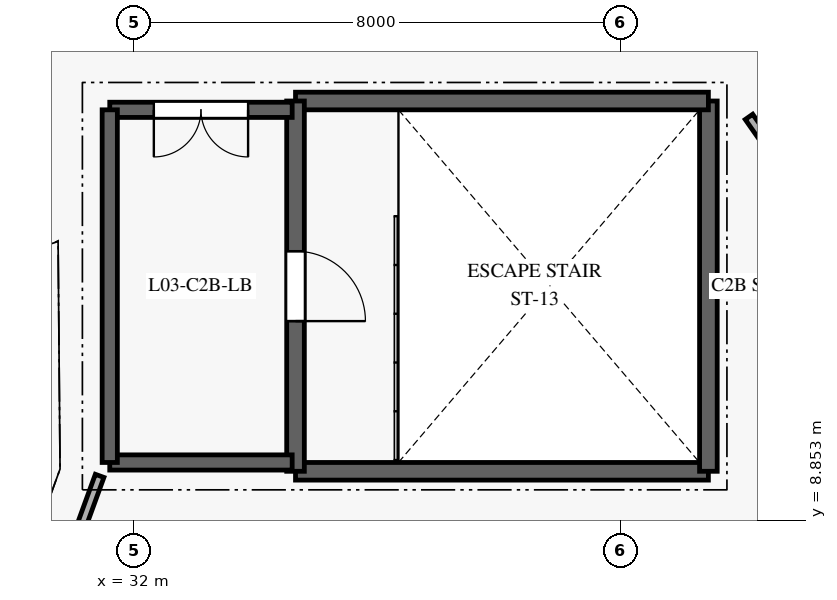
"""IFC4 building model, lengths in metres.
Left out: names, types, materials, properties, quantities, classifications, styles, units other than length and angle.
Written with IfcOpenShell. Run it as: python <this file> out.ifc"""

import sys

from ifc_helpers import new_model, si_unit, direction, frame, frame_2d, origin, place, context, subcontext, project, spatial, rectangle, extrude, element, fill, save


model = new_model("IFC4")
c1 = context("Model", 3, precision=1e-05, world=origin(), true_north=direction((0.0, 1.0)))
c2 = subcontext(c1, "Body", "Model", "MODEL_VIEW")
j1 = project(units=[si_unit("LENGTHUNIT", "METRE"), si_unit("PLANEANGLEUNIT", "RADIAN")], contexts=[c1])
p1 = place(None, origin())
s1 = spatial("IfcSite", under=j1, at=p1, CompositionType="ELEMENT")
p2 = place(p1, origin())
s2 = spatial("IfcBuilding", under=s1, at=p2, CompositionType="ELEMENT")
p3 = place(p2, frame((0.0, 0.0, 12.6)))
s3 = spatial("IfcBuildingStorey", under=s2, at=p3, CompositionType="ELEMENT", Elevation=12.6)
p4 = place(p3, frame((34.655, 9.655, 0.0), z_axis=(0.0, 0.0, 1.0), x_axis=(1.0, 0.0, 0.0)))
e1 = element("IfcWall", 1, at=p4, inside=s3, PredefinedType="SHEAR", context=c2, shape_type="SweptSolid", body=[
    extrude(rectangle(XDim=6.79, YDim=0.29, at=frame_2d((3.395, 0.0))), origin(), (0.0, 0.0, 1.0), 3.95),
])
p5 = place(p3, frame((41.445, 9.655, 0.0), z_axis=(0.0, 0.0, 1.0), x_axis=(0.0, 1.0, 0.0)))
e2 = element("IfcWall", 2, at=p5, inside=s3, PredefinedType="SHEAR", context=c2, shape_type="SweptSolid", body=[
    extrude(rectangle(XDim=6.09, YDim=0.29, at=frame_2d((3.045, 0.0))), origin(), (0.0, 0.0, 1.0), 3.95),
])
p6 = place(p3, frame((41.445, 15.745, 0.0), z_axis=(0.0, 0.0, 1.0), x_axis=(-1.0, 0.0, 0.0)))
e3 = element("IfcWall", 3, at=p6, inside=s3, PredefinedType="SHEAR", context=c2, shape_type="SweptSolid", body=[
    extrude(rectangle(XDim=6.79, YDim=0.29, at=frame_2d((3.395, 0.0))), origin(), (0.0, 0.0, 1.0), 3.95),
])
p7 = place(p3, frame((34.655, 15.745, 0.0), z_axis=(0.0, 0.0, 1.0), x_axis=(0.0, -1.0, 0.0)))
e4 = element("IfcWall", 4, at=p7, inside=s3, PredefinedType="SHEAR", context=c2, shape_type="SweptSolid", body=[
    extrude(rectangle(XDim=6.09, YDim=0.29, at=frame_2d((3.045, 0.0))), origin(), (0.0, 0.0, 1.0), 3.95),
])
p8 = place(p7, frame((2.47, 0.0, 0.0)))
e5 = element("IfcOpeningElement", 5, at=p8, cuts=e4, PredefinedType="OPENING", context=c2, shape_type="SweptSolid", body=[
    extrude(rectangle(XDim=1.15, YDim=2.1, at=frame_2d((0.575, 1.05))), frame((0.0, 0.155, 0.0), z_axis=(0.0, -1.0, 0.0), x_axis=(1.0, 0.0, 0.0)), (0.0, 0.0, 1.0), 0.31),
])
p9 = place(p3, frame((31.6, 9.8, 0.0), z_axis=(0.0, 0.0, 1.0), x_axis=(1.0, 0.0, 0.0)))
e6 = element("IfcWall", 6, at=p9, inside=s3, PredefinedType="SHEAR", context=c2, shape_type="SweptSolid", body=[
    extrude(rectangle(XDim=3.0, YDim=0.25, at=frame_2d((1.5, 0.0))), origin(), (0.0, 0.0, 1.0), 3.95),
])
p10 = place(p3, frame((34.6, 15.6, 0.0), z_axis=(0.0, 0.0, 1.0), x_axis=(-1.0, 0.0, 0.0)))
e7 = element("IfcWall", 7, at=p10, inside=s3, PredefinedType="SHEAR", context=c2, shape_type="SweptSolid", body=[
    extrude(rectangle(XDim=3.0, YDim=0.25, at=frame_2d((1.5, 0.0))), origin(), (0.0, 0.0, 1.0), 3.95),
])
p11 = place(p10, frame((0.725, 0.0, 0.0)))
e8 = element("IfcOpeningElement", 8, at=p11, cuts=e7, PredefinedType="OPENING", context=c2, shape_type="SweptSolid", body=[
    extrude(rectangle(XDim=1.55, YDim=2.15, at=frame_2d((0.775, 1.075))), frame((0.0, 0.135, 0.0), z_axis=(0.0, -1.0, 0.0), x_axis=(1.0, 0.0, 0.0)), (0.0, 0.0, 1.0), 0.27),
])
p12 = place(p3, frame((31.6, 15.6, 0.0), z_axis=(0.0, 0.0, 1.0), x_axis=(0.0, -1.0, 0.0)))
e9 = element("IfcWall", 9, at=p12, inside=s3, PredefinedType="SHEAR", context=c2, shape_type="SweptSolid", body=[
    extrude(rectangle(XDim=5.8, YDim=0.25, at=frame_2d((2.9, 0.0))), origin(), (0.0, 0.0, 1.0), 3.95),
])
p13 = place(p3, frame((31.028, 8.464, 0.0), z_axis=(0.0, 0.0, 1.0), x_axis=(0.341957686727, 0.939715350778, 0.0)))
e10 = element("IfcWall", 10, at=p13, inside=s3, PredefinedType="PARTITIONING", context=c2, shape_type="SweptSolid", body=[
    extrude(rectangle(XDim=1.187, YDim=0.15, at=frame_2d((0.594, 0.0))), origin(), (0.0, 0.0, 1.0), 3.95),
])
p14 = place(p3, frame((42.113, 15.484, 0.0), z_axis=(0.0, 0.0, 1.0), x_axis=(0.573593915898, -0.8191398047, 0.0)))
e11 = element("IfcWall", 11, at=p14, inside=s3, PredefinedType="PARTITIONING", context=c2, shape_type="SweptSolid", body=[
    extrude(rectangle(XDim=6.102, YDim=0.15, at=frame_2d((3.051, 0.0))), origin(), (0.0, 0.0, 1.0), 3.95),
])
p15 = place(p8, origin())
e12 = element("IfcDoor", 12, at=p15, inside=s3, OperationType="SINGLE_SWING_RIGHT", PredefinedType="DOOR", context=c2, shape_type="SweptSolid", body=[
    extrude(rectangle(XDim=1.15, YDim=2.1, at=frame_2d((0.575, 1.05))), frame((0.0, 0.025, 0.0), z_axis=(0.0, -1.0, 0.0), x_axis=(1.0, 0.0, 0.0)), (0.0, 0.0, 1.0), 0.05),
])
fill(e5, e12)
p16 = place(p11, origin())
e13 = element("IfcDoor", 13, at=p16, inside=s3, OperationType="DOUBLE_DOOR_SINGLE_SWING", PredefinedType="DOOR", context=c2, shape_type="SweptSolid", body=[
    extrude(rectangle(XDim=1.55, YDim=2.15, at=frame_2d((0.775, 1.075))), frame((0.0, 0.025, 0.0), z_axis=(0.0, -1.0, 0.0), x_axis=(1.0, 0.0, 0.0)), (0.0, 0.0, 1.0), 0.05),
])
fill(e8, e13)
save(model, sys.argv[1])
